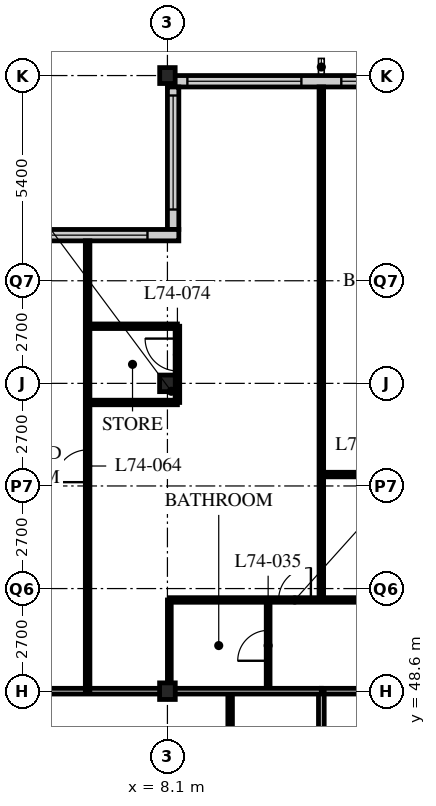
"""IFC4 building model, lengths in metres.
Left out: names, types, materials, properties, quantities, classifications, styles, units other than length and angle.
Written with IfcOpenShell. Run it as: python <this file> out.ifc"""

import sys

from ifc_helpers import new_model, si_unit, direction, frame, frame_2d, origin, origin_2d, place, context, subcontext, project, spatial, rectangle, i_section, extrude, element, fill, save


model = new_model("IFC4")
c1 = context("Model", 3, precision=1e-05, world=origin(), true_north=direction((0.0, 1.0)))
c2 = subcontext(c1, "Body", "Model", "MODEL_VIEW")
j1 = project(units=[si_unit("LENGTHUNIT", "METRE"), si_unit("PLANEANGLEUNIT", "RADIAN")], contexts=[c1])
p1 = place(None, origin())
s1 = spatial("IfcSite", under=j1, at=p1, CompositionType="ELEMENT")
p2 = place(p1, origin())
s2 = spatial("IfcBuilding", under=s1, at=p2, CompositionType="ELEMENT")
p3 = place(p2, frame((0.0, 0.0, 289.2)))
s3 = spatial("IfcBuildingStorey", under=s2, at=p3, CompositionType="ELEMENT", Elevation=289.2)
for number, where, z_axis, x_axis in (
    (1, (8.1, 48.6, 0.0), (0.0, 0.0, 1.0), (1.0, 0.0, 0.0)),
    (2, (8.1, 56.7, 0.0), (0.0, 0.0, 1.0), (1.0, 0.0, 0.0)),
):
    element("IfcColumn", number, at=place(p3, frame(where, z_axis=z_axis, x_axis=x_axis)), inside=s3, PredefinedType="COLUMN", context=c2, shape_type="SweptSolid", body=[
        extrude(i_section(OverallWidth=0.412, OverallDepth=0.437, WebThickness=0.036, FlangeThickness=0.058, FilletRadius=0.015, at=origin_2d()), origin(), (0.0, 0.0, 1.0), 3.9),
    ])
p4 = place(p3, frame((8.1, 64.8, 0.0), z_axis=(0.0, 0.0, 1.0), x_axis=(1.0, 0.0, 0.0)))
e3 = element("IfcColumn", 3, at=p4, inside=s3, PredefinedType="COLUMN", context=c2, shape_type="SweptSolid", body=[
    extrude(i_section(OverallWidth=0.407, OverallDepth=0.419, WebThickness=0.031, FlangeThickness=0.049, FilletRadius=0.015, at=origin_2d()), origin(), (0.0, 0.0, 1.0), 3.9),
])
p5 = place(p3, frame((48.3, 64.65, 0.0), z_axis=(0.0, 0.0, 1.0), x_axis=(-1.0, 0.0, 0.0)))
e4 = element("IfcWall", 4, at=p5, inside=s3, PredefinedType="SOLIDWALL", context=c2, shape_type="SweptSolid", body=[
    extrude(rectangle(XDim=40.2, YDim=0.3, at=frame_2d((20.1, 0.0))), origin(), (0.0, 0.0, 1.0), 3.69),
])
p6 = place(p5, frame((0.225, 0.0, 0.6)))
e5 = element("IfcOpeningElement", 5, at=p6, cuts=e4, PredefinedType="OPENING", context=c2, shape_type="SweptSolid", body=[
    extrude(rectangle(XDim=3.0, YDim=2.4, at=frame_2d((1.5, 1.2))), frame((0.0, 0.16, 0.0), z_axis=(0.0, -1.0, 0.0), x_axis=(1.0, 0.0, 0.0)), (0.0, 0.0, 1.0), 0.32),
])
p7 = place(p5, frame((4.275, 0.0, 0.6)))
e6 = element("IfcOpeningElement", 6, at=p7, cuts=e4, PredefinedType="OPENING", context=c2, shape_type="SweptSolid", body=[
    extrude(rectangle(XDim=3.0, YDim=2.4, at=frame_2d((1.5, 1.2))), frame((0.0, 0.16, 0.0), z_axis=(0.0, -1.0, 0.0), x_axis=(1.0, 0.0, 0.0)), (0.0, 0.0, 1.0), 0.32),
])
p8 = place(p5, frame((8.325, 0.0, 0.6)))
e7 = element("IfcOpeningElement", 7, at=p8, cuts=e4, PredefinedType="OPENING", context=c2, shape_type="SweptSolid", body=[
    extrude(rectangle(XDim=3.0, YDim=2.4, at=frame_2d((1.5, 1.2))), frame((0.0, 0.16, 0.0), z_axis=(0.0, -1.0, 0.0), x_axis=(1.0, 0.0, 0.0)), (0.0, 0.0, 1.0), 0.32),
])
p9 = place(p5, frame((12.375, 0.0, 0.6)))
e8 = element("IfcOpeningElement", 8, at=p9, cuts=e4, PredefinedType="OPENING", context=c2, shape_type="SweptSolid", body=[
    extrude(rectangle(XDim=3.0, YDim=2.4, at=frame_2d((1.5, 1.2))), frame((0.0, 0.16, 0.0), z_axis=(0.0, -1.0, 0.0), x_axis=(1.0, 0.0, 0.0)), (0.0, 0.0, 1.0), 0.32),
])
p10 = place(p5, frame((16.425, 0.0, 0.6)))
e9 = element("IfcOpeningElement", 9, at=p10, cuts=e4, PredefinedType="OPENING", context=c2, shape_type="SweptSolid", body=[
    extrude(rectangle(XDim=3.0, YDim=2.4, at=frame_2d((1.5, 1.2))), frame((0.0, 0.16, 0.0), z_axis=(0.0, -1.0, 0.0), x_axis=(1.0, 0.0, 0.0)), (0.0, 0.0, 1.0), 0.32),
])
p11 = place(p5, frame((20.475, 0.0, 0.6)))
e10 = element("IfcOpeningElement", 10, at=p11, cuts=e4, PredefinedType="OPENING", context=c2, shape_type="SweptSolid", body=[
    extrude(rectangle(XDim=3.0, YDim=2.4, at=frame_2d((1.5, 1.2))), frame((0.0, 0.16, 0.0), z_axis=(0.0, -1.0, 0.0), x_axis=(1.0, 0.0, 0.0)), (0.0, 0.0, 1.0), 0.32),
])
p12 = place(p5, frame((24.525, 0.0, 0.6)))
e11 = element("IfcOpeningElement", 11, at=p12, cuts=e4, PredefinedType="OPENING", context=c2, shape_type="SweptSolid", body=[
    extrude(rectangle(XDim=3.0, YDim=2.4, at=frame_2d((1.5, 1.2))), frame((0.0, 0.16, 0.0), z_axis=(0.0, -1.0, 0.0), x_axis=(1.0, 0.0, 0.0)), (0.0, 0.0, 1.0), 0.32),
])
p13 = place(p5, frame((28.575, 0.0, 0.6)))
e12 = element("IfcOpeningElement", 12, at=p13, cuts=e4, PredefinedType="OPENING", context=c2, shape_type="SweptSolid", body=[
    extrude(rectangle(XDim=3.0, YDim=2.4, at=frame_2d((1.5, 1.2))), frame((0.0, 0.16, 0.0), z_axis=(0.0, -1.0, 0.0), x_axis=(1.0, 0.0, 0.0)), (0.0, 0.0, 1.0), 0.32),
])
p14 = place(p5, frame((32.625, 0.0, 0.6)))
e13 = element("IfcOpeningElement", 13, at=p14, cuts=e4, PredefinedType="OPENING", context=c2, shape_type="SweptSolid", body=[
    extrude(rectangle(XDim=3.0, YDim=2.4, at=frame_2d((1.5, 1.2))), frame((0.0, 0.16, 0.0), z_axis=(0.0, -1.0, 0.0), x_axis=(1.0, 0.0, 0.0)), (0.0, 0.0, 1.0), 0.32),
])
p15 = place(p5, frame((36.675, 0.0, 0.6)))
e14 = element("IfcOpeningElement", 14, at=p15, cuts=e4, PredefinedType="OPENING", context=c2, shape_type="SweptSolid", body=[
    extrude(rectangle(XDim=3.0, YDim=2.4, at=frame_2d((1.5, 1.2))), frame((0.0, 0.16, 0.0), z_axis=(0.0, -1.0, 0.0), x_axis=(1.0, 0.0, 0.0)), (0.0, 0.0, 1.0), 0.32),
])
p16 = place(p3, frame((8.25, 64.5, 0.0), z_axis=(0.0, 0.0, 1.0), x_axis=(0.0, -1.0, 0.0)))
e15 = element("IfcWall", 15, at=p16, inside=s3, PredefinedType="SOLIDWALL", context=c2, shape_type="SweptSolid", body=[
    extrude(rectangle(XDim=3.75, YDim=0.3, at=frame_2d((1.875, 0.0))), origin(), (0.0, 0.0, 1.0), 3.69),
])
p17 = place(p16, frame((0.225, 0.0, 0.6)))
e16 = element("IfcOpeningElement", 16, at=p17, cuts=e15, PredefinedType="OPENING", context=c2, shape_type="SweptSolid", body=[
    extrude(rectangle(XDim=3.0, YDim=2.3, at=frame_2d((1.5, 1.15))), frame((0.0, 0.16, 0.0), z_axis=(0.0, -1.0, 0.0), x_axis=(1.0, 0.0, 0.0)), (0.0, 0.0, 1.0), 0.32),
])
p18 = place(p3, frame((8.4, 60.6, 0.0), z_axis=(0.0, 0.0, 1.0), x_axis=(-1.0, 0.0, 0.0)))
e17 = element("IfcWall", 17, at=p18, inside=s3, PredefinedType="SOLIDWALL", context=c2, shape_type="SweptSolid", body=[
    extrude(rectangle(XDim=4.35, YDim=0.3, at=frame_2d((2.175, 0.0))), origin(), (0.0, 0.0, 1.0), 3.69),
])
p19 = place(p18, frame((0.825, 0.0, 0.6)))
e18 = element("IfcOpeningElement", 18, at=p19, cuts=e17, PredefinedType="OPENING", context=c2, shape_type="SweptSolid", body=[
    extrude(rectangle(XDim=3.0, YDim=2.3, at=frame_2d((1.5, 1.15))), frame((0.0, 0.16, 0.0), z_axis=(0.0, -1.0, 0.0), x_axis=(1.0, 0.0, 0.0)), (0.0, 0.0, 1.0), 0.32),
])
p20 = place(p3, frame((12.15, 48.6, 0.0), z_axis=(0.0, 0.0, 1.0), x_axis=(1.0, 0.0, 0.0)))
e19 = element("IfcWall", 19, at=p20, inside=s3, PredefinedType="PARTITIONING", context=c2, shape_type="SweptSolid", body=[
    extrude(rectangle(XDim=24.3, YDim=0.15, at=frame_2d((12.15, 0.0))), origin(), (0.0, 0.0, 1.0), 3.078),
])
p21 = place(p20, frame((4.95, 0.0, 0.0)))
e20 = element("IfcOpeningElement", 20, at=p21, cuts=e19, PredefinedType="OPENING", context=c2, shape_type="SweptSolid", body=[
    extrude(rectangle(XDim=1.0, YDim=2.1, at=frame_2d((0.5, 1.05))), frame((0.0, 0.085, 0.0), z_axis=(0.0, -1.0, 0.0), x_axis=(1.0, 0.0, 0.0)), (0.0, 0.0, 1.0), 0.17),
])
p22 = place(p20, frame((16.6, 0.0, 0.0)))
e21 = element("IfcOpeningElement", 21, at=p22, cuts=e19, PredefinedType="OPENING", context=c2, shape_type="SweptSolid", body=[
    extrude(rectangle(XDim=1.0, YDim=2.1, at=frame_2d((0.5, 1.05))), frame((0.0, 0.085, 0.0), z_axis=(0.0, -1.0, 0.0), x_axis=(1.0, 0.0, 0.0)), (0.0, 0.0, 1.0), 0.17),
])
p23 = place(p20, frame((1.525, 0.0, 0.0)))
e22 = element("IfcOpeningElement", 22, at=p23, cuts=e19, PredefinedType="OPENING", context=c2, shape_type="SweptSolid", body=[
    extrude(rectangle(XDim=1.0, YDim=2.1, at=frame_2d((0.5, 1.05))), frame((0.0, 0.085, 0.0), z_axis=(0.0, -1.0, 0.0), x_axis=(1.0, 0.0, 0.0)), (0.0, 0.0, 1.0), 0.17),
])
p24 = place(p3, frame((12.15, 22.5, 0.0), z_axis=(0.0, 0.0, 1.0), x_axis=(0.0, 1.0, 0.0)))
e23 = element("IfcWall", 23, at=p24, inside=s3, PredefinedType="PARTITIONING", context=c2, shape_type="SweptSolid", body=[
    extrude(rectangle(XDim=26.1, YDim=0.15, at=frame_2d((13.05, 0.0))), origin(), (0.0, 0.0, 1.0), 3.69),
])
p25 = place(p24, frame((0.4, 0.0, 0.0)))
e24 = element("IfcOpeningElement", 24, at=p25, cuts=e23, PredefinedType="OPENING", context=c2, shape_type="SweptSolid", body=[
    extrude(rectangle(XDim=1.0, YDim=2.1, at=frame_2d((0.5, 1.05))), frame((0.0, 0.085, 0.0), z_axis=(0.0, -1.0, 0.0), x_axis=(1.0, 0.0, 0.0)), (0.0, 0.0, 1.0), 0.17),
])
p26 = place(p3, frame((9.75, 22.5, 0.0), z_axis=(0.0, 0.0, 1.0), x_axis=(0.0, 1.0, 0.0)))
e25 = element("IfcWall", 25, at=p26, inside=s3, PredefinedType="PARTITIONING", context=c2, shape_type="SweptSolid", body=[
    extrude(rectangle(XDim=26.1, YDim=0.12, at=frame_2d((13.05, 0.0))), origin(), (0.0, 0.0, 1.0), 3.69),
])
p27 = place(p26, frame((0.975, 0.0, 0.0)))
e26 = element("IfcOpeningElement", 26, at=p27, cuts=e25, PredefinedType="OPENING", context=c2, shape_type="SweptSolid", body=[
    extrude(rectangle(XDim=0.85, YDim=2.1, at=frame_2d((0.425, 1.05))), frame((0.0, 0.07, 0.0), z_axis=(0.0, -1.0, 0.0), x_axis=(1.0, 0.0, 0.0)), (0.0, 0.0, 1.0), 0.14),
])
p28 = place(p26, frame((10.225, 0.0, 0.0)))
e27 = element("IfcOpeningElement", 27, at=p28, cuts=e25, PredefinedType="OPENING", context=c2, shape_type="SweptSolid", body=[
    extrude(rectangle(XDim=0.85, YDim=2.1, at=frame_2d((0.425, 1.05))), frame((0.0, 0.07, 0.0), z_axis=(0.0, -1.0, 0.0), x_axis=(1.0, 0.0, 0.0)), (0.0, 0.0, 1.0), 0.14),
])
p29 = place(p26, frame((14.275, 0.0, 0.0)))
e28 = element("IfcOpeningElement", 28, at=p29, cuts=e25, PredefinedType="OPENING", context=c2, shape_type="SweptSolid", body=[
    extrude(rectangle(XDim=0.85, YDim=2.1, at=frame_2d((0.425, 1.05))), frame((0.0, 0.07, 0.0), z_axis=(0.0, -1.0, 0.0), x_axis=(1.0, 0.0, 0.0)), (0.0, 0.0, 1.0), 0.14),
])
p30 = place(p26, frame((18.325, 0.0, 0.0)))
e29 = element("IfcOpeningElement", 29, at=p30, cuts=e25, PredefinedType="OPENING", context=c2, shape_type="SweptSolid", body=[
    extrude(rectangle(XDim=0.85, YDim=2.1, at=frame_2d((0.425, 1.05))), frame((0.0, 0.07, 0.0), z_axis=(0.0, -1.0, 0.0), x_axis=(1.0, 0.0, 0.0)), (0.0, 0.0, 1.0), 0.14),
])
p31 = place(p26, frame((22.375, 0.0, 0.0)))
e30 = element("IfcOpeningElement", 30, at=p31, cuts=e25, PredefinedType="OPENING", context=c2, shape_type="SweptSolid", body=[
    extrude(rectangle(XDim=0.85, YDim=2.1, at=frame_2d((0.425, 1.05))), frame((0.0, 0.07, 0.0), z_axis=(0.0, -1.0, 0.0), x_axis=(1.0, 0.0, 0.0)), (0.0, 0.0, 1.0), 0.14),
])
p32 = place(p3, frame((10.75, 48.6, 0.0), z_axis=(0.0, 0.0, 1.0), x_axis=(0.0, 1.0, 0.0)))
e31 = element("IfcWall", 31, at=p32, inside=s3, PredefinedType="PARTITIONING", context=c2, shape_type="SweptSolid", body=[
    extrude(rectangle(XDim=2.4, YDim=0.1, at=frame_2d((1.2, 0.0))), origin(), (0.0, 0.0, 1.0), 3.69),
])
p33 = place(p32, frame((0.8, 0.0, 0.0)))
e32 = element("IfcOpeningElement", 32, at=p33, cuts=e31, PredefinedType="OPENING", context=c2, shape_type="SweptSolid", body=[
    extrude(rectangle(XDim=0.8, YDim=2.1, at=frame_2d((0.4, 1.05))), frame((0.0, 0.06, 0.0), z_axis=(0.0, -1.0, 0.0), x_axis=(1.0, 0.0, 0.0)), (0.0, 0.0, 1.0), 0.12),
])
p34 = place(p3, frame((8.15, 48.6, 0.0), z_axis=(0.0, 0.0, 1.0), x_axis=(0.0, 1.0, 0.0)))
e33 = element("IfcWall", 33, at=p34, inside=s3, PredefinedType="PARTITIONING", context=c2, shape_type="SweptSolid", body=[
    extrude(rectangle(XDim=2.4, YDim=0.1, at=frame_2d((1.2, 0.0))), origin(), (0.0, 0.0, 1.0), 3.078),
])
p35 = place(p3, frame((8.15, 51.0, 0.0), z_axis=(0.0, 0.0, 1.0), x_axis=(1.0, 0.0, 0.0)))
e34 = element("IfcWall", 34, at=p35, inside=s3, PredefinedType="PARTITIONING", context=c2, shape_type="SweptSolid", body=[
    extrude(rectangle(XDim=28.3, YDim=0.12, at=frame_2d((14.15, 0.0))), origin(), (0.0, 0.0, 1.0), 3.69),
])
p36 = place(p35, frame((9.025, 0.0, 0.0)))
e35 = element("IfcOpeningElement", 35, at=p36, cuts=e34, PredefinedType="OPENING", context=c2, shape_type="SweptSolid", body=[
    extrude(rectangle(XDim=0.85, YDim=2.1, at=frame_2d((0.425, 1.05))), frame((0.0, 0.07, 0.0), z_axis=(0.0, -1.0, 0.0), x_axis=(1.0, 0.0, 0.0)), (0.0, 0.0, 1.0), 0.14),
])
p37 = place(p35, frame((16.475, 0.0, 0.0)))
e36 = element("IfcOpeningElement", 36, at=p37, cuts=e34, PredefinedType="OPENING", context=c2, shape_type="SweptSolid", body=[
    extrude(rectangle(XDim=0.85, YDim=2.1, at=frame_2d((0.425, 1.05))), frame((0.0, 0.07, 0.0), z_axis=(0.0, -1.0, 0.0), x_axis=(1.0, 0.0, 0.0)), (0.0, 0.0, 1.0), 0.14),
])
p38 = place(p35, frame((21.175, 0.0, 0.0)))
e37 = element("IfcOpeningElement", 37, at=p38, cuts=e34, PredefinedType="OPENING", context=c2, shape_type="SweptSolid", body=[
    extrude(rectangle(XDim=0.85, YDim=2.1, at=frame_2d((0.425, 1.05))), frame((0.0, 0.07, 0.0), z_axis=(0.0, -1.0, 0.0), x_axis=(1.0, 0.0, 0.0)), (0.0, 0.0, 1.0), 0.14),
])
p39 = place(p35, frame((24.575, 0.0, 0.0)))
e38 = element("IfcOpeningElement", 38, at=p39, cuts=e34, PredefinedType="OPENING", context=c2, shape_type="SweptSolid", body=[
    extrude(rectangle(XDim=0.85, YDim=2.1, at=frame_2d((0.425, 1.05))), frame((0.0, 0.07, 0.0), z_axis=(0.0, -1.0, 0.0), x_axis=(1.0, 0.0, 0.0)), (0.0, 0.0, 1.0), 0.14),
])
p40 = place(p35, frame((6.725, 0.0, 0.0)))
e39 = element("IfcOpeningElement", 39, at=p40, cuts=e34, PredefinedType="OPENING", context=c2, shape_type="SweptSolid", body=[
    extrude(rectangle(XDim=0.85, YDim=2.1, at=frame_2d((0.425, 1.05))), frame((0.0, 0.07, 0.0), z_axis=(0.0, -1.0, 0.0), x_axis=(1.0, 0.0, 0.0)), (0.0, 0.0, 1.0), 0.14),
])
p41 = place(p35, frame((2.875, 0.0, 0.0)))
e40 = element("IfcOpeningElement", 40, at=p41, cuts=e34, PredefinedType="OPENING", context=c2, shape_type="SweptSolid", body=[
    extrude(rectangle(XDim=0.85, YDim=2.1, at=frame_2d((0.425, 1.05))), frame((0.0, 0.07, 0.0), z_axis=(0.0, -1.0, 0.0), x_axis=(1.0, 0.0, 0.0)), (0.0, 0.0, 1.0), 0.14),
])
p42 = place(p3, frame((12.15, 51.0, 0.0), z_axis=(0.0, 0.0, 1.0), x_axis=(0.0, 1.0, 0.0)))
e41 = element("IfcWall", 41, at=p42, inside=s3, PredefinedType="PARTITIONING", context=c2, shape_type="SweptSolid", body=[
    extrude(rectangle(XDim=13.5, YDim=0.12, at=frame_2d((6.75, 0.0))), origin(), (0.0, 0.0, 1.0), 3.69),
])
p43 = place(p3, frame((0.3, 48.6, 0.0), z_axis=(0.0, 0.0, 1.0), x_axis=(1.0, 0.0, 0.0)))
e42 = element("IfcWall", 42, at=p43, inside=s3, PredefinedType="PARTITIONING", context=c2, shape_type="SweptSolid", body=[
    extrude(rectangle(XDim=11.85, YDim=0.15, at=frame_2d((5.925, 0.0))), origin(), (0.0, 0.0, 1.0), 3.078),
])
p44 = place(p3, frame((12.15, 54.3, 0.0), z_axis=(0.0, 0.0, 1.0), x_axis=(1.0, 0.0, 0.0)))
e43 = element("IfcWall", 43, at=p44, inside=s3, PredefinedType="PARTITIONING", context=c2, shape_type="SweptSolid", body=[
    extrude(rectangle(XDim=4.05, YDim=0.12, at=frame_2d((2.025, 0.0))), origin(), (0.0, 0.0, 1.0), 3.69),
])
p45 = place(p44, frame((1.6, 0.0, 0.0)))
e44 = element("IfcOpeningElement", 44, at=p45, cuts=e43, PredefinedType="OPENING", context=c2, shape_type="SweptSolid", body=[
    extrude(rectangle(XDim=0.85, YDim=2.1, at=frame_2d((0.425, 1.05))), frame((0.0, 0.07, 0.0), z_axis=(0.0, -1.0, 0.0), x_axis=(1.0, 0.0, 0.0)), (0.0, 0.0, 1.0), 0.14),
])
p46 = place(p3, frame((6.0, 48.6, 0.0), z_axis=(0.0, 0.0, 1.0), x_axis=(0.0, 1.0, 0.0)))
e45 = element("IfcWall", 45, at=p46, inside=s3, PredefinedType="PARTITIONING", context=c2, shape_type="SweptSolid", body=[
    extrude(rectangle(XDim=11.85, YDim=0.12, at=frame_2d((5.925, 0.0))), origin(), (0.0, 0.0, 1.0), 3.69),
])
p47 = place(p46, frame((5.5, 0.0, 0.0)))
e46 = element("IfcOpeningElement", 46, at=p47, cuts=e45, PredefinedType="OPENING", context=c2, shape_type="SweptSolid", body=[
    extrude(rectangle(XDim=0.85, YDim=2.1, at=frame_2d((0.425, 1.05))), frame((0.0, 0.07, 0.0), z_axis=(0.0, -1.0, 0.0), x_axis=(1.0, 0.0, 0.0)), (0.0, 0.0, 1.0), 0.14),
])
for number, where, z_axis, x_axis in (
    (47, (6.0, 56.197, 0.0), (0.0, 0.0, 1.0), (1.0, 0.0, 0.0)),
    (48, (6.0, 58.203, 0.0), (0.0, 0.0, 1.0), (1.0, 0.0, 0.0)),
):
    element("IfcWall", number, at=place(p3, frame(where, z_axis=z_axis, x_axis=x_axis)), inside=s3, PredefinedType="PARTITIONING", context=c2, shape_type="SweptSolid", body=[
        extrude(rectangle(XDim=2.363, YDim=0.12, at=frame_2d((1.182, 0.0))), origin(), (0.0, 0.0, 1.0), 3.69),
    ])
p48 = place(p3, frame((8.363, 56.197, 0.0), z_axis=(0.0, 0.0, 1.0), x_axis=(0.0, 1.0, 0.0)))
e49 = element("IfcWall", 49, at=p48, inside=s3, PredefinedType="PARTITIONING", context=c2, shape_type="SweptSolid", body=[
    extrude(rectangle(XDim=2.006, YDim=0.12, at=frame_2d((1.003, 0.0))), origin(), (0.0, 0.0, 1.0), 3.69),
])
p49 = place(p48, frame((0.831, 0.0, 0.0)))
e50 = element("IfcOpeningElement", 50, at=p49, cuts=e49, PredefinedType="OPENING", context=c2, shape_type="SweptSolid", body=[
    extrude(rectangle(XDim=0.85, YDim=2.1, at=frame_2d((0.425, 1.05))), frame((0.0, 0.07, 0.0), z_axis=(0.0, -1.0, 0.0), x_axis=(1.0, 0.0, 0.0)), (0.0, 0.0, 1.0), 0.14),
])
p50 = place(p14, origin())
e51 = element("IfcWindow", 51, at=p50, inside=s3, PartitioningType="SINGLE_PANEL", PredefinedType="WINDOW", context=c2, shape_type="SweptSolid", body=[
    extrude(rectangle(XDim=3.0, YDim=2.4, at=frame_2d((1.5, 1.2))), frame((0.0, 0.03, 0.0), z_axis=(0.0, -1.0, 0.0), x_axis=(1.0, 0.0, 0.0)), (0.0, 0.0, 1.0), 0.06),
])
fill(e13, e51)
p51 = place(p15, origin())
e52 = element("IfcWindow", 52, at=p51, inside=s3, PartitioningType="SINGLE_PANEL", PredefinedType="WINDOW", context=c2, shape_type="SweptSolid", body=[
    extrude(rectangle(XDim=3.0, YDim=2.4, at=frame_2d((1.5, 1.2))), frame((0.0, 0.03, 0.0), z_axis=(0.0, -1.0, 0.0), x_axis=(1.0, 0.0, 0.0)), (0.0, 0.0, 1.0), 0.06),
])
fill(e14, e52)
p52 = place(p17, origin())
e53 = element("IfcWindow", 53, at=p52, inside=s3, PartitioningType="SINGLE_PANEL", PredefinedType="WINDOW", context=c2, shape_type="SweptSolid", body=[
    extrude(rectangle(XDim=3.0, YDim=2.3, at=frame_2d((1.5, 1.15))), frame((0.0, 0.03, 0.0), z_axis=(0.0, -1.0, 0.0), x_axis=(1.0, 0.0, 0.0)), (0.0, 0.0, 1.0), 0.06),
])
fill(e16, e53)
p53 = place(p19, origin())
e54 = element("IfcWindow", 54, at=p53, inside=s3, PartitioningType="SINGLE_PANEL", PredefinedType="WINDOW", context=c2, shape_type="SweptSolid", body=[
    extrude(rectangle(XDim=3.0, YDim=2.3, at=frame_2d((1.5, 1.15))), frame((0.0, 0.03, 0.0), z_axis=(0.0, -1.0, 0.0), x_axis=(1.0, 0.0, 0.0)), (0.0, 0.0, 1.0), 0.06),
])
fill(e18, e54)
p54 = place(p33, origin())
e55 = element("IfcDoor", 55, at=p54, inside=s3, OperationType="SINGLE_SWING_LEFT", PredefinedType="DOOR", context=c2, shape_type="SweptSolid", body=[
    extrude(rectangle(XDim=0.8, YDim=2.1, at=frame_2d((0.4, 1.05))), frame((0.0, 0.025, 0.0), z_axis=(0.0, -1.0, 0.0), x_axis=(1.0, 0.0, 0.0)), (0.0, 0.0, 1.0), 0.05),
])
fill(e32, e55)
p55 = place(p41, origin())
e56 = element("IfcDoor", 56, at=p55, inside=s3, OperationType="SINGLE_SWING_RIGHT", PredefinedType="DOOR", context=c2, shape_type="SweptSolid", body=[
    extrude(rectangle(XDim=0.85, YDim=2.1, at=frame_2d((0.425, 1.05))), frame((0.0, 0.025, 0.0), z_axis=(0.0, -1.0, 0.0), x_axis=(1.0, 0.0, 0.0)), (0.0, 0.0, 1.0), 0.05),
])
fill(e40, e56)
p56 = place(p47, origin())
e57 = element("IfcDoor", 57, at=p56, inside=s3, OperationType="SINGLE_SWING_LEFT", PredefinedType="DOOR", context=c2, shape_type="SweptSolid", body=[
    extrude(rectangle(XDim=0.85, YDim=2.1, at=frame_2d((0.425, 1.05))), frame((0.0, 0.025, 0.0), z_axis=(0.0, -1.0, 0.0), x_axis=(1.0, 0.0, 0.0)), (0.0, 0.0, 1.0), 0.05),
])
fill(e46, e57)
p57 = place(p49, origin())
e58 = element("IfcDoor", 58, at=p57, inside=s3, OperationType="SINGLE_SWING_RIGHT", PredefinedType="DOOR", context=c2, shape_type="SweptSolid", body=[
    extrude(rectangle(XDim=0.85, YDim=2.1, at=frame_2d((0.425, 1.05))), frame((0.0, 0.025, 0.0), z_axis=(0.0, -1.0, 0.0), x_axis=(1.0, 0.0, 0.0)), (0.0, 0.0, 1.0), 0.05),
])
fill(e50, e58)
save(model, sys.argv[1])
